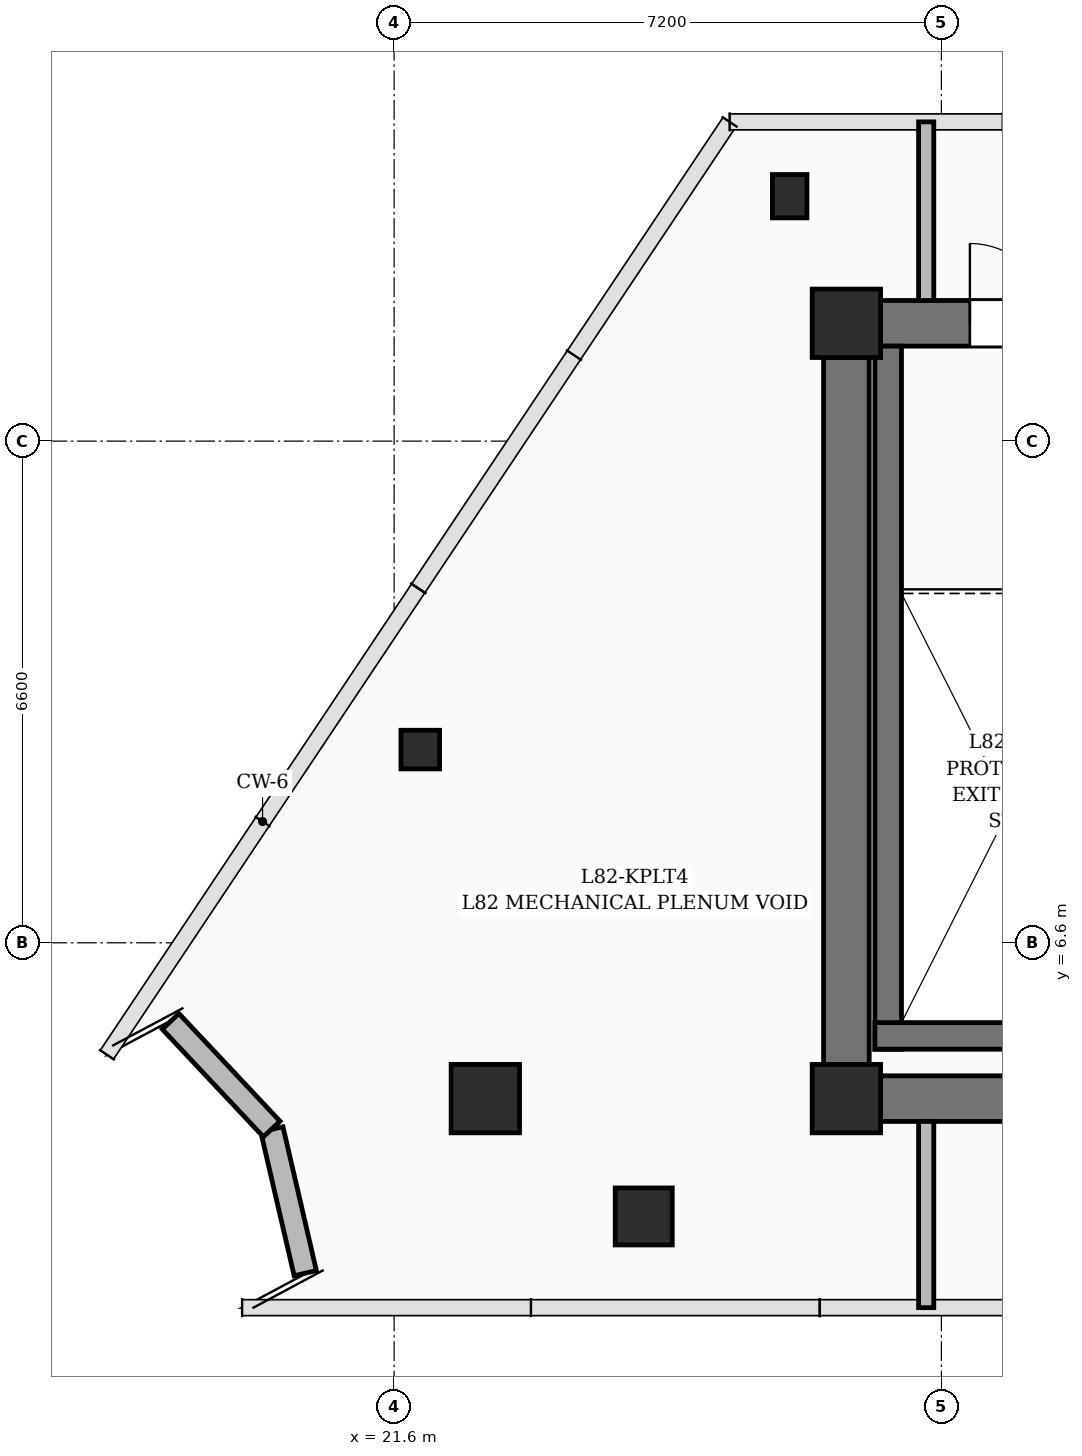
"""IFC4 building model, lengths in metres.
Left out: names, types, materials, properties, quantities, classifications, styles, units other than length and angle.
Written with IfcOpenShell. Run it as: python <this file> out.ifc"""

import sys

from ifc_helpers import new_model, si_unit, direction, frame, frame_2d, origin, origin_2d, place, context, subcontext, project, spatial, rectangle, hollow_circle, i_section, extrude, element, fill, save


model = new_model("IFC4")
c1 = context("Model", 3, precision=1e-05, world=origin(), true_north=direction((0.0, 1.0)))
c2 = subcontext(c1, "Body", "Model", "MODEL_VIEW")
j1 = project(units=[si_unit("LENGTHUNIT", "METRE"), si_unit("PLANEANGLEUNIT", "RADIAN")], contexts=[c1])
p1 = place(None, origin())
s1 = spatial("IfcSite", under=j1, at=p1, CompositionType="ELEMENT")
p2 = place(p1, origin())
s2 = spatial("IfcBuilding", under=s1, at=p2, CompositionType="ELEMENT")
p3 = place(p2, frame((0.0, 0.0, 318.5)))
s3 = spatial("IfcBuildingStorey", under=s2, at=p3, CompositionType="ELEMENT", Elevation=318.5)
for number, where, z_axis, x_axis in (
    (1, (27.55, 4.55, 0.0), (0.0, 0.0, 1.0), (1.0, 0.0, 0.0)),
    (2, (27.55, 14.75, 0.0), (0.0, 0.0, 1.0), (1.0, 0.0, 0.0)),
    (3, (22.8, 4.55, 0.0), (0.0, 0.0, 1.0), (1.0, 0.0, 0.0)),
):
    element("IfcColumn", number, at=place(p3, frame(where, z_axis=z_axis, x_axis=x_axis)), inside=s3, PredefinedType="COLUMN", context=c2, shape_type="SweptSolid", body=[
        extrude(rectangle(XDim=0.9, YDim=0.9, at=origin_2d()), origin(), (0.0, 0.0, 1.0), 3.4),
    ])
p4 = place(p3, frame((28.0, 4.55, 0.0), z_axis=(0.0, 0.0, 1.0), x_axis=(1.0, 0.0, 0.0)))
e4 = element("IfcWall", 4, at=p4, inside=s3, PredefinedType="SHEAR", context=c2, shape_type="SweptSolid", body=[
    extrude(rectangle(XDim=6.7, YDim=0.6, at=frame_2d((3.35, 0.0))), origin(), (0.0, 0.0, 1.0), 3.4),
])
p5 = place(p3, frame((28.0, 14.75, 0.0), z_axis=(0.0, 0.0, 1.0), x_axis=(1.0, 0.0, 0.0)))
e5 = element("IfcWall", 5, at=p5, inside=s3, PredefinedType="SHEAR", context=c2, shape_type="SweptSolid", body=[
    extrude(rectangle(XDim=6.7, YDim=0.6, at=frame_2d((3.35, 0.0))), origin(), (0.0, 0.0, 1.0), 3.4),
])
p6 = place(p5, frame((1.175, 0.0, 0.0)))
e6 = element("IfcOpeningElement", 6, at=p6, cuts=e5, PredefinedType="OPENING", context=c2, shape_type="SweptSolid", body=[
    extrude(rectangle(XDim=1.05, YDim=2.15, at=frame_2d((0.525, 1.075))), frame((0.0, 0.31, 0.0), z_axis=(0.0, -1.0, 0.0), x_axis=(1.0, 0.0, 0.0)), (0.0, 0.0, 1.0), 0.62),
])
p7 = place(p5, frame((5.025, 0.0, 0.0)))
e7 = element("IfcOpeningElement", 7, at=p7, cuts=e5, PredefinedType="OPENING", context=c2, shape_type="SweptSolid", body=[
    extrude(rectangle(XDim=0.95, YDim=2.15, at=frame_2d((0.475, 1.075))), frame((0.0, 0.31, 0.0), z_axis=(0.0, -1.0, 0.0), x_axis=(1.0, 0.0, 0.0)), (0.0, 0.0, 1.0), 0.62),
])
p8 = place(p3, frame((27.55, 5.0, 0.0), z_axis=(0.0, 0.0, 1.0), x_axis=(0.0, 1.0, 0.0)))
e8 = element("IfcWall", 8, at=p8, inside=s3, PredefinedType="SHEAR", context=c2, shape_type="SweptSolid", body=[
    extrude(rectangle(XDim=9.3, YDim=0.6, at=frame_2d((4.65, 0.0))), origin(), (0.0, 0.0, 1.0), 3.4),
])
p9 = place(p3, frame((28.1, 5.2, 0.0), z_axis=(0.0, 0.0, 1.0), x_axis=(0.0, 1.0, 0.0)))
e9 = element("IfcWall", 9, at=p9, inside=s3, PredefinedType="SOLIDWALL", context=c2, shape_type="SweptSolid", body=[
    extrude(rectangle(XDim=9.25, YDim=0.35, at=frame_2d((4.625, 0.0))), origin(), (0.0, 0.0, 1.0), 3.4),
])
p10 = place(p3, frame((27.925, 5.375, 0.0), z_axis=(0.0, 0.0, 1.0), x_axis=(1.0, 0.0, 0.0)))
e10 = element("IfcWall", 10, at=p10, inside=s3, PredefinedType="SOLIDWALL", context=c2, shape_type="SweptSolid", body=[
    extrude(rectangle(XDim=3.55, YDim=0.35, at=frame_2d((1.775, 0.0))), origin(), (0.0, 0.0, 1.0), 3.4),
])
p11 = place(p3, frame((24.884, 3.0, 0.0), z_axis=(0.0, 0.0, 1.0), x_axis=(1.0, 0.0, 0.0)))
e11 = element("IfcColumn", 11, at=p11, inside=s3, PredefinedType="COLUMN", context=c2, shape_type="SweptSolid", body=[
    extrude(rectangle(XDim=0.75, YDim=0.75, at=origin_2d()), origin(), (0.0, 0.0, 1.0), 3.4),
])
p12 = place(p3, frame((26.804, 16.422, 0.0), z_axis=(0.0, 0.0, 1.0), x_axis=(1.0, 0.0, 0.0)))
e12 = element("IfcColumn", 12, at=p12, inside=s3, PredefinedType="COLUMN", context=c2, shape_type="SweptSolid", body=[
    extrude(i_section(OverallWidth=0.454, OverallDepth=0.57, WebThickness=0.078, FlangeThickness=0.094, FilletRadius=0.02, at=origin_2d()), origin(), (0.0, 0.0, 1.0), 3.4),
])
p13 = place(p3, frame((21.944, 9.142, 0.0), z_axis=(0.0, 0.0, 1.0), x_axis=(1.0, 0.0, 0.0)))
e13 = element("IfcColumn", 13, at=p13, inside=s3, PredefinedType="COLUMN", context=c2, shape_type="SweptSolid", body=[
    extrude(hollow_circle(Radius=0.254, WallThickness=0.016, at=origin_2d()), origin(), (0.0, 0.0, 1.0), 3.4),
])
p14 = place(p3, frame((20.431, 2.253, 0.0), z_axis=(0.0, 0.0, 1.0), x_axis=(-0.226355436514, 0.97404477123, 0.0)))
e14 = element("IfcWall", 14, at=p14, inside=s3, PredefinedType="SOLIDWALL", context=c2, shape_type="SweptSolid", body=[
    extrude(rectangle(XDim=1.943, YDim=0.3, at=frame_2d((0.971, 0.0))), origin(), (0.0, 0.0, 1.0), 3.4),
])
p15 = place(p3, frame((19.989, 4.15, 0.0), z_axis=(0.0, 0.0, 1.0), x_axis=(-0.684517683679, 0.728996255636, 0.0)))
e15 = element("IfcWall", 15, at=p15, inside=s3, PredefinedType="SOLIDWALL", context=c2, shape_type="SweptSolid", body=[
    extrude(rectangle(XDim=1.943, YDim=0.3, at=frame_2d((0.972, 0.0))), origin(), (0.0, 0.0, 1.0), 3.4),
])
p16 = place(p3, frame((28.6, 4.25, 0.0), z_axis=(0.0, 0.0, 1.0), x_axis=(0.0, -1.0, 0.0)))
e16 = element("IfcWall", 16, at=p16, inside=s3, PredefinedType="PARTITIONING", context=c2, shape_type="SweptSolid", body=[
    extrude(rectangle(XDim=2.45, YDim=0.2, at=frame_2d((1.225, 0.0))), origin(), (0.0, 0.0, 1.0), 3.68),
])
p17 = place(p3, frame((28.6, 17.4, 0.0), z_axis=(0.0, 0.0, 1.0), x_axis=(0.0, -1.0, 0.0)))
e17 = element("IfcWall", 17, at=p17, inside=s3, PredefinedType="PARTITIONING", context=c2, shape_type="SweptSolid", body=[
    extrude(rectangle(XDim=2.35, YDim=0.2, at=frame_2d((1.175, 0.0))), origin(), (0.0, 0.0, 1.0), 3.68),
])
p18 = place(p6, origin())
e18 = element("IfcDoor", 18, at=p18, inside=s3, OperationType="SINGLE_SWING_LEFT", PredefinedType="DOOR", context=c2, shape_type="SweptSolid", body=[
    extrude(rectangle(XDim=1.05, YDim=2.15, at=frame_2d((0.525, 1.075))), frame((0.0, 0.025, 0.0), z_axis=(0.0, -1.0, 0.0), x_axis=(1.0, 0.0, 0.0)), (0.0, 0.0, 1.0), 0.05),
])
fill(e6, e18)
save(model, sys.argv[1])
